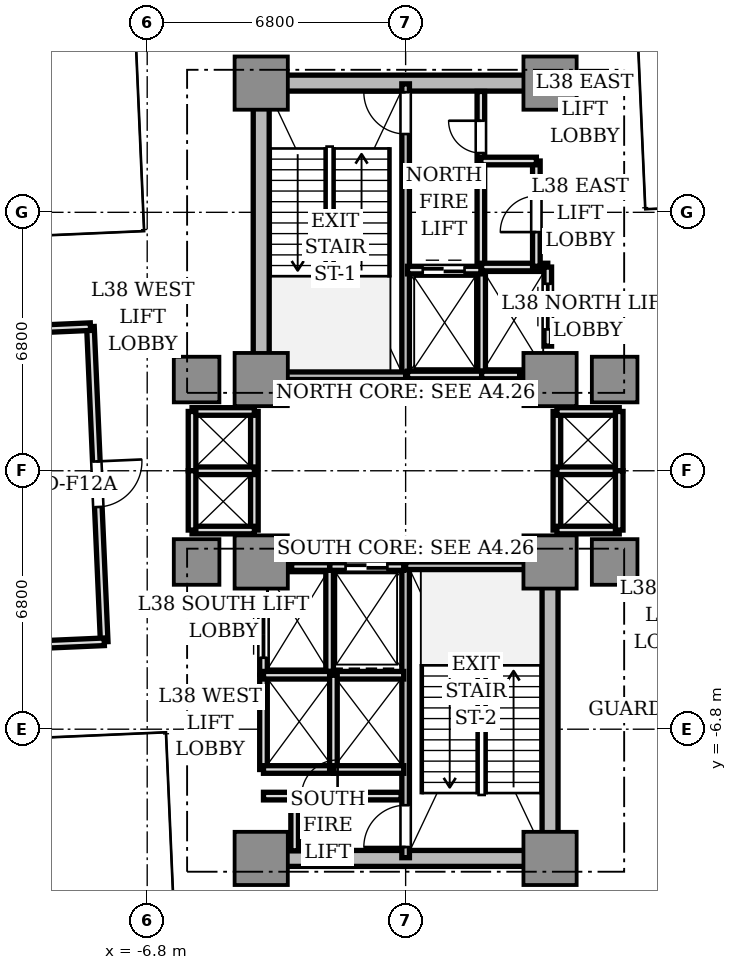
"""IFC4 building model, lengths in metres.
Left out: names, types, materials, properties, quantities, classifications, styles, units other than length and angle.
Written with IfcOpenShell. Run it as: python <this file> out.ifc"""

import sys

from ifc_helpers import new_model, si_unit, direction, frame, frame_2d, origin, origin_2d, place, context, subcontext, project, spatial, rectangle, extrude, source, transform, mapped, element, fill, save


model = new_model("IFC4")
c1 = context("Model", 3, precision=1e-05, world=origin(), true_north=direction((0.0, 1.0)))
c2 = subcontext(c1, "Body", "Model", "MODEL_VIEW")
j1 = project(units=[si_unit("LENGTHUNIT", "METRE"), si_unit("PLANEANGLEUNIT", "RADIAN")], contexts=[c1])
p1 = place(None, origin())
s1 = spatial("IfcSite", under=j1, at=p1, CompositionType="ELEMENT")
p2 = place(p1, origin())
s2 = spatial("IfcBuilding", under=s1, at=p2, CompositionType="ELEMENT")
p3 = place(p2, frame((0.0, 0.0, 138.25)))
s3 = spatial("IfcBuildingStorey", under=s2, at=p3, CompositionType="ELEMENT", Elevation=138.25)
p4 = place(p3, frame((-3.55, 10.2, 0.0), z_axis=(0.0, 0.0, 1.0), x_axis=(1.0, 0.0, 0.0)))
e1 = element("IfcWall", 1, at=p4, inside=s3, PredefinedType="SHEAR", context=c2, shape_type="SweptSolid", body=[
    extrude(rectangle(XDim=7.1, YDim=0.42, at=frame_2d((3.55, 0.0))), origin(), (0.0, 0.0, 1.0), 4.18),
])
p5 = place(p3, frame((-3.8, 2.85, 0.0), z_axis=(0.0, 0.0, 1.0), x_axis=(0.0, 1.0, 0.0)))
e2 = element("IfcWall", 2, at=p5, inside=s3, PredefinedType="SHEAR", context=c2, shape_type="SweptSolid", body=[
    extrude(rectangle(XDim=6.9, YDim=0.42, at=frame_2d((3.45, 0.0))), origin(), (0.0, 0.0, 1.0), 4.18),
])
p6 = place(p3, frame((-3.55, -10.2, 0.0), z_axis=(0.0, 0.0, 1.0), x_axis=(1.0, 0.0, 0.0)))
e3 = element("IfcWall", 3, at=p6, inside=s3, PredefinedType="SHEAR", context=c2, shape_type="SweptSolid", body=[
    extrude(rectangle(XDim=7.1, YDim=0.42, at=frame_2d((3.55, 0.0))), origin(), (0.0, 0.0, 1.0), 4.18),
])
p7 = place(p3, frame((3.8, -9.75, 0.0), z_axis=(0.0, 0.0, 1.0), x_axis=(0.0, 1.0, 0.0)))
e4 = element("IfcWall", 4, at=p7, inside=s3, PredefinedType="SHEAR", context=c2, shape_type="SweptSolid", body=[
    extrude(rectangle(XDim=6.9, YDim=0.42, at=frame_2d((3.45, 0.0))), origin(), (0.0, 0.0, 1.0), 4.18),
])
m1 = source(origin(), c2, "Body", "SweptSolid", [
    extrude(rectangle(XDim=1.4, YDim=1.4, at=origin_2d()), origin(), (0.0, 0.0, 1.0), 4.18),
])
for number, where, z_axis, x_axis in (
    (5, (-3.8, 2.4, 0.0), (0.0, 0.0, 1.0), (1.0, 0.0, 0.0)),
    (6, (3.8, 2.4, 0.0), (0.0, 0.0, 1.0), (1.0, 0.0, 0.0)),
    (7, (-3.8, 10.2, 0.0), (0.0, 0.0, 1.0), (1.0, 0.0, 0.0)),
    (8, (3.8, 10.2, 0.0), (0.0, 0.0, 1.0), (1.0, 0.0, 0.0)),
    (9, (-3.8, -2.4, 0.0), (0.0, 0.0, 1.0), (1.0, 0.0, 0.0)),
    (10, (3.8, -2.4, 0.0), (0.0, 0.0, 1.0), (1.0, 0.0, 0.0)),
    (11, (-3.8, -10.2, 0.0), (0.0, 0.0, 1.0), (1.0, 0.0, 0.0)),
    (12, (3.8, -10.2, 0.0), (0.0, 0.0, 1.0), (1.0, 0.0, 0.0)),
):
    element("IfcColumn", number, at=place(p3, frame(where, z_axis=z_axis, x_axis=x_axis)), inside=s3, PredefinedType="COLUMN", context=c2, shape_type="MappedRepresentation", body=[
        mapped(m1, transform((0.0, 0.0, 0.0), scale=1.0)),
    ])
m2 = source(origin(), c2, "Body", "SweptSolid", [
    extrude(rectangle(XDim=1.2, YDim=1.2, at=origin_2d()), origin(), (0.0, 0.0, 1.0), 4.18),
])
for number, where, z_axis, x_axis in (
    (13, (5.5, 2.4, 0.0), (0.0, 0.0, 1.0), (1.0, 0.0, 0.0)),
    (14, (-5.5, 2.4, 0.0), (0.0, 0.0, 1.0), (1.0, 0.0, 0.0)),
    (15, (5.5, -2.4, 0.0), (0.0, 0.0, 1.0), (1.0, 0.0, 0.0)),
    (16, (-5.5, -2.4, 0.0), (0.0, 0.0, 1.0), (1.0, 0.0, 0.0)),
):
    element("IfcColumn", number, at=place(p3, frame(where, z_axis=z_axis, x_axis=x_axis)), inside=s3, PredefinedType="COLUMN", context=c2, shape_type="MappedRepresentation", body=[
        mapped(m2, transform((0.0, 0.0, 0.0), scale=1.0)),
    ])
p8 = place(p3, frame((0.0, 2.5, 0.0), z_axis=(0.0, 0.0, 1.0), x_axis=(0.0, 1.0, 0.0)))
e17 = element("IfcWall", 17, at=p8, inside=s3, PredefinedType="SOLIDWALL", context=c2, shape_type="SweptSolid", body=[
    extrude(rectangle(XDim=7.68, YDim=0.2, at=frame_2d((3.84, 0.0))), origin(), (0.0, 0.0, 1.0), 4.18),
])
p9 = place(p8, frame((6.36, 0.0, 0.0)))
e18 = element("IfcOpeningElement", 18, at=p9, cuts=e17, PredefinedType="OPENING", context=c2, shape_type="SweptSolid", body=[
    extrude(rectangle(XDim=1.1, YDim=2.15, at=frame_2d((0.55, 1.075))), frame((0.0, 0.11, 0.0), z_axis=(0.0, -1.0, 0.0), x_axis=(1.0, 0.0, 0.0)), (0.0, 0.0, 1.0), 0.22),
])
p10 = place(p3, frame((-3.72, 2.5, 0.0), z_axis=(0.0, 0.0, 1.0), x_axis=(1.0, 0.0, 0.0)))
e19 = element("IfcWall", 19, at=p10, inside=s3, PredefinedType="SOLIDWALL", context=c2, shape_type="SweptSolid", body=[
    extrude(rectangle(XDim=3.72, YDim=0.2, at=frame_2d((1.86, 0.0))), origin(), (0.0, 0.0, 1.0), 4.18),
])
p11 = place(p3, frame((0.0, -10.18, 0.0), z_axis=(0.0, 0.0, 1.0), x_axis=(0.0, 1.0, 0.0)))
e20 = element("IfcWall", 20, at=p11, inside=s3, PredefinedType="SOLIDWALL", context=c2, shape_type="SweptSolid", body=[
    extrude(rectangle(XDim=7.68, YDim=0.2, at=frame_2d((3.84, 0.0))), origin(), (0.0, 0.0, 1.0), 4.18),
])
p12 = place(p11, frame((0.28, 0.0, 0.0)))
e21 = element("IfcOpeningElement", 21, at=p12, cuts=e20, PredefinedType="OPENING", context=c2, shape_type="SweptSolid", body=[
    extrude(rectangle(XDim=1.1, YDim=2.15, at=frame_2d((0.55, 1.075))), frame((0.0, 0.11, 0.0), z_axis=(0.0, -1.0, 0.0), x_axis=(1.0, 0.0, 0.0)), (0.0, 0.0, 1.0), 0.22),
])
p13 = place(p3, frame((0.0, -2.5, 0.0), z_axis=(0.0, 0.0, 1.0), x_axis=(1.0, 0.0, 0.0)))
e22 = element("IfcWall", 22, at=p13, inside=s3, PredefinedType="SOLIDWALL", context=c2, shape_type="SweptSolid", body=[
    extrude(rectangle(XDim=3.72, YDim=0.2, at=frame_2d((1.86, 0.0))), origin(), (0.0, 0.0, 1.0), 4.18),
])
p14 = place(p3, frame((1.98, 5.32, 0.0), z_axis=(0.0, 0.0, 1.0), x_axis=(0.0, 1.0, 0.0)))
e23 = element("IfcWall", 23, at=p14, inside=s3, PredefinedType="SOLIDWALL", context=c2, shape_type="SweptSolid", body=[
    extrude(rectangle(XDim=4.66, YDim=0.2, at=frame_2d((2.33, 0.0))), origin(), (0.0, 0.0, 1.0), 3.73),
])
p15 = place(p14, frame((3.04, 0.0, 0.0)))
e24 = element("IfcOpeningElement", 24, at=p15, cuts=e23, PredefinedType="OPENING", context=c2, shape_type="SweptSolid", body=[
    extrude(rectangle(XDim=0.85, YDim=2.1, at=frame_2d((0.425, 1.05))), frame((0.0, 0.11, 0.0), z_axis=(0.0, -1.0, 0.0), x_axis=(1.0, 0.0, 0.0)), (0.0, 0.0, 1.0), 0.22),
])
p16 = place(p3, frame((2.0, 2.5, 0.0), z_axis=(0.0, 0.0, 1.0), x_axis=(0.0, 1.0, 0.0)))
e25 = element("IfcWall", 25, at=p16, inside=s3, PredefinedType="SOLIDWALL", context=c2, shape_type="SweptSolid", body=[
    extrude(rectangle(XDim=2.78, YDim=0.2, at=frame_2d((1.39, 0.0))), origin(), (0.0, 0.0, 1.0), 3.73),
])
p17 = place(p3, frame((0.05, 2.52, 0.0), z_axis=(0.0, 0.0, 1.0), x_axis=(1.0, 0.0, 0.0)))
e26 = element("IfcWall", 26, at=p17, inside=s3, PredefinedType="SOLIDWALL", context=c2, shape_type="SweptSolid", body=[
    extrude(rectangle(XDim=1.95, YDim=0.2, at=frame_2d((0.975, 0.0))), origin(), (0.0, 0.0, 1.0), 3.73),
])
p18 = place(p3, frame((0.05, 5.28, 0.0), z_axis=(0.0, 0.0, 1.0), x_axis=(1.0, 0.0, 0.0)))
e27 = element("IfcWall", 27, at=p18, inside=s3, PredefinedType="SOLIDWALL", context=c2, shape_type="SweptSolid", body=[
    extrude(rectangle(XDim=1.93, YDim=0.2, at=frame_2d((0.965, 0.0))), origin(), (0.0, 0.0, 1.0), 3.73),
])
p19 = place(p18, frame((0.4, 0.0, 0.0)))
e28 = element("IfcOpeningElement", 28, at=p19, cuts=e27, PredefinedType="OPENING", context=c2, shape_type="SweptSolid", body=[
    extrude(rectangle(XDim=1.1, YDim=2.2, at=frame_2d((0.55, 1.1))), frame((0.0, 0.11, 0.0), z_axis=(0.0, -1.0, 0.0), x_axis=(1.0, 0.0, 0.0)), (0.0, 0.0, 1.0), 0.22),
])
p20 = place(p3, frame((-2.0, -5.28, 0.0), z_axis=(0.0, 0.0, 1.0), x_axis=(0.0, 1.0, 0.0)))
e29 = element("IfcWall", 29, at=p20, inside=s3, PredefinedType="SOLIDWALL", context=c2, shape_type="SweptSolid", body=[
    extrude(rectangle(XDim=2.78, YDim=0.2, at=frame_2d((1.39, 0.0))), origin(), (0.0, 0.0, 1.0), 3.73),
])
p21 = place(p3, frame((-2.0, -2.52, 0.0), z_axis=(0.0, 0.0, 1.0), x_axis=(1.0, 0.0, 0.0)))
e30 = element("IfcWall", 30, at=p21, inside=s3, PredefinedType="SOLIDWALL", context=c2, shape_type="SweptSolid", body=[
    extrude(rectangle(XDim=1.95, YDim=0.2, at=frame_2d((0.975, 0.0))), origin(), (0.0, 0.0, 1.0), 3.73),
])
p22 = place(p21, frame((0.42, 0.0, 0.0)))
e31 = element("IfcOpeningElement", 31, at=p22, cuts=e30, PredefinedType="OPENING", context=c2, shape_type="SweptSolid", body=[
    extrude(rectangle(XDim=1.1, YDim=2.2, at=frame_2d((0.55, 1.1))), frame((0.0, 0.11, 0.0), z_axis=(0.0, -1.0, 0.0), x_axis=(1.0, 0.0, 0.0)), (0.0, 0.0, 1.0), 0.22),
])
p23 = place(p3, frame((2.0, 2.52, 0.0), z_axis=(0.0, 0.0, 1.0), x_axis=(1.0, 0.0, 0.0)))
e32 = element("IfcWall", 32, at=p23, inside=s3, PredefinedType="SOLIDWALL", context=c2, shape_type="SweptSolid", body=[
    extrude(rectangle(XDim=1.0, YDim=0.2, at=frame_2d((0.5, 0.0))), origin(), (0.0, 0.0, 1.0), 3.73),
])
p24 = place(p3, frame((2.0, 5.36, 0.0), z_axis=(0.0, 0.0, 1.0), x_axis=(1.0, 0.0, 0.0)))
e33 = element("IfcWall", 33, at=p24, inside=s3, PredefinedType="SOLIDWALL", context=c2, shape_type="SweptSolid", body=[
    extrude(rectangle(XDim=1.74, YDim=0.2, at=frame_2d((0.87, 0.0))), origin(), (0.0, 0.0, 1.0), 3.73),
])
p25 = place(p3, frame((3.74, 3.28, 0.0), z_axis=(0.0, 0.0, 1.0), x_axis=(0.0, 1.0, 0.0)))
e34 = element("IfcWall", 34, at=p25, inside=s3, PredefinedType="SOLIDWALL", context=c2, shape_type="SweptSolid", body=[
    extrude(rectangle(XDim=2.08, YDim=0.2, at=frame_2d((1.04, 0.0))), origin(), (0.0, 0.0, 1.0), 3.73),
])
p26 = place(p25, frame((0.44, 0.0, 0.0)))
e35 = element("IfcOpeningElement", 35, at=p26, cuts=e34, PredefinedType="OPENING", context=c2, shape_type="SweptSolid", body=[
    extrude(rectangle(XDim=1.2, YDim=2.2, at=frame_2d((0.6, 1.1))), frame((0.0, 0.11, 0.0), z_axis=(0.0, -1.0, 0.0), x_axis=(1.0, 0.0, 0.0)), (0.0, 0.0, 1.0), 0.22),
])
p27 = place(p3, frame((-3.0, -2.52, 0.0), z_axis=(0.0, 0.0, 1.0), x_axis=(1.0, 0.0, 0.0)))
e36 = element("IfcWall", 36, at=p27, inside=s3, PredefinedType="SOLIDWALL", context=c2, shape_type="SweptSolid", body=[
    extrude(rectangle(XDim=1.0, YDim=0.2, at=frame_2d((0.5, 0.0))), origin(), (0.0, 0.0, 1.0), 3.73),
])
p28 = place(p3, frame((-3.74, -5.36, 0.0), z_axis=(0.0, 0.0, 1.0), x_axis=(0.0, 1.0, 0.0)))
e37 = element("IfcWall", 37, at=p28, inside=s3, PredefinedType="SOLIDWALL", context=c2, shape_type="SweptSolid", body=[
    extrude(rectangle(XDim=2.08, YDim=0.2, at=frame_2d((1.04, 0.0))), origin(), (0.0, 0.0, 1.0), 3.73),
])
p29 = place(p28, frame((0.44, 0.0, 0.0)))
e38 = element("IfcOpeningElement", 38, at=p29, cuts=e37, PredefinedType="OPENING", context=c2, shape_type="SweptSolid", body=[
    extrude(rectangle(XDim=1.2, YDim=2.2, at=frame_2d((0.6, 1.1))), frame((0.0, 0.11, 0.0), z_axis=(0.0, -1.0, 0.0), x_axis=(1.0, 0.0, 0.0)), (0.0, 0.0, 1.0), 0.22),
])
p30 = place(p3, frame((-3.74, -7.86, 0.0), z_axis=(0.0, 0.0, 1.0), x_axis=(0.0, 1.0, 0.0)))
e39 = element("IfcWall", 39, at=p30, inside=s3, PredefinedType="SOLIDWALL", context=c2, shape_type="SweptSolid", body=[
    extrude(rectangle(XDim=2.48, YDim=0.2, at=frame_2d((1.24, 0.0))), origin(), (0.0, 0.0, 1.0), 3.73),
])
p31 = place(p3, frame((-3.74, -7.86, 0.0), z_axis=(0.0, 0.0, 1.0), x_axis=(1.0, 0.0, 0.0)))
e40 = element("IfcWall", 40, at=p31, inside=s3, PredefinedType="SOLIDWALL", context=c2, shape_type="SweptSolid", body=[
    extrude(rectangle(XDim=1.84, YDim=0.2, at=frame_2d((0.92, 0.0))), origin(), (0.0, 0.0, 1.0), 3.73),
])
p32 = place(p3, frame((-3.74, -5.38, 0.0), z_axis=(0.0, 0.0, 1.0), x_axis=(1.0, 0.0, 0.0)))
e41 = element("IfcWall", 41, at=p32, inside=s3, PredefinedType="SOLIDWALL", context=c2, shape_type="SweptSolid", body=[
    extrude(rectangle(XDim=3.69, YDim=0.2, at=frame_2d((1.845, 0.0))), origin(), (0.0, 0.0, 1.0), 3.73),
])
p33 = place(p3, frame((-1.9, -7.86, 0.0), z_axis=(0.0, 0.0, 1.0), x_axis=(0.0, 1.0, 0.0)))
e42 = element("IfcWall", 42, at=p33, inside=s3, PredefinedType="SOLIDWALL", context=c2, shape_type="SweptSolid", body=[
    extrude(rectangle(XDim=2.48, YDim=0.2, at=frame_2d((1.24, 0.0))), origin(), (0.0, 0.0, 1.0), 3.73),
])
p34 = place(p3, frame((-1.9, -7.86, 0.0), z_axis=(0.0, 0.0, 1.0), x_axis=(1.0, 0.0, 0.0)))
e43 = element("IfcWall", 43, at=p34, inside=s3, PredefinedType="SOLIDWALL", context=c2, shape_type="SweptSolid", body=[
    extrude(rectangle(XDim=1.85, YDim=0.2, at=frame_2d((0.925, 0.0))), origin(), (0.0, 0.0, 1.0), 3.73),
])
p35 = place(p3, frame((3.98, -1.56, 0.0), z_axis=(0.0, 0.0, 1.0), x_axis=(0.0, 1.0, 0.0)))
e44 = element("IfcWall", 44, at=p35, inside=s3, PredefinedType="SOLIDWALL", context=c2, shape_type="SweptSolid", body=[
    extrude(rectangle(XDim=3.12, YDim=0.2, at=frame_2d((1.56, 0.0))), origin(), (0.0, 0.0, 1.0), 3.35),
])
for number, where, z_axis, x_axis in (
    (45, (3.98, 1.56, 0.0), (0.0, 0.0, 1.0), (1.0, 0.0, 0.0)),
    (46, (3.98, -1.56, 0.0), (0.0, 0.0, 1.0), (1.0, 0.0, 0.0)),
    (47, (3.98, 0.0, 0.0), (0.0, 0.0, 1.0), (1.0, 0.0, 0.0)),
):
    element("IfcWall", number, at=place(p3, frame(where, z_axis=z_axis, x_axis=x_axis)), inside=s3, PredefinedType="SOLIDWALL", context=c2, shape_type="SweptSolid", body=[
        extrude(rectangle(XDim=1.64, YDim=0.2, at=frame_2d((0.82, 0.0))), origin(), (0.0, 0.0, 1.0), 3.73),
    ])
for number, where, z_axis, x_axis in (
    (48, (5.62, 0.0, 0.0), (0.0, 0.0, 1.0), (0.0, 1.0, 0.0)),
    (49, (5.62, -1.56, 0.0), (0.0, 0.0, 1.0), (0.0, 1.0, 0.0)),
):
    element("IfcWall", number, at=place(p3, frame(where, z_axis=z_axis, x_axis=x_axis)), inside=s3, PredefinedType="SOLIDWALL", context=c2, shape_type="SweptSolid", body=[
        extrude(rectangle(XDim=1.56, YDim=0.2, at=frame_2d((0.78, 0.0))), origin(), (0.0, 0.0, 1.0), 3.73),
    ])
p36 = place(p3, frame((-3.98, -1.56, 0.0), z_axis=(0.0, 0.0, 1.0), x_axis=(0.0, 1.0, 0.0)))
e50 = element("IfcWall", 50, at=p36, inside=s3, PredefinedType="SOLIDWALL", context=c2, shape_type="SweptSolid", body=[
    extrude(rectangle(XDim=3.12, YDim=0.2, at=frame_2d((1.56, 0.0))), origin(), (0.0, 0.0, 1.0), 3.35),
])
for number, where, z_axis, x_axis in (
    (51, (-5.62, 1.56, 0.0), (0.0, 0.0, 1.0), (1.0, 0.0, 0.0)),
    (52, (-5.62, -1.56, 0.0), (0.0, 0.0, 1.0), (1.0, 0.0, 0.0)),
    (53, (-5.62, 0.0, 0.0), (0.0, 0.0, 1.0), (1.0, 0.0, 0.0)),
):
    element("IfcWall", number, at=place(p3, frame(where, z_axis=z_axis, x_axis=x_axis)), inside=s3, PredefinedType="SOLIDWALL", context=c2, shape_type="SweptSolid", body=[
        extrude(rectangle(XDim=1.64, YDim=0.2, at=frame_2d((0.82, 0.0))), origin(), (0.0, 0.0, 1.0), 3.73),
    ])
for number, where, z_axis, x_axis in (
    (54, (-5.62, 0.0, 0.0), (0.0, 0.0, 1.0), (0.0, 1.0, 0.0)),
    (55, (-5.62, -1.56, 0.0), (0.0, 0.0, 1.0), (0.0, 1.0, 0.0)),
):
    element("IfcWall", number, at=place(p3, frame(where, z_axis=z_axis, x_axis=x_axis)), inside=s3, PredefinedType="SOLIDWALL", context=c2, shape_type="SweptSolid", body=[
        extrude(rectangle(XDim=1.56, YDim=0.2, at=frame_2d((0.78, 0.0))), origin(), (0.0, 0.0, 1.0), 3.73),
    ])
p37 = place(p3, frame((-3.74, -8.56, 0.0), z_axis=(0.0, 0.0, 1.0), x_axis=(1.0, 0.0, 0.0)))
e56 = element("IfcWall", 56, at=p37, inside=s3, PredefinedType="SOLIDWALL", context=c2, shape_type="SweptSolid", body=[
    extrude(rectangle(XDim=3.62, YDim=0.2, at=frame_2d((1.81, 0.0))), origin(), (0.0, 0.0, 1.0), 3.73),
])
p38 = place(p37, frame((1.0, 0.0, 0.0)))
e57 = element("IfcOpeningElement", 57, at=p38, cuts=e56, PredefinedType="OPENING", context=c2, shape_type="SweptSolid", body=[
    extrude(rectangle(XDim=0.95, YDim=2.15, at=frame_2d((0.475, 1.075))), frame((0.0, 0.11, 0.0), z_axis=(0.0, -1.0, 0.0), x_axis=(1.0, 0.0, 0.0)), (0.0, 0.0, 1.0), 0.22),
])
p39 = place(p3, frame((-2.92, -10.0, 0.0), z_axis=(0.0, 0.0, 1.0), x_axis=(0.0, 1.0, 0.0)))
e58 = element("IfcWall", 58, at=p39, inside=s3, PredefinedType="SOLIDWALL", context=c2, shape_type="SweptSolid", body=[
    extrude(rectangle(XDim=1.44, YDim=0.2, at=frame_2d((0.72, 0.0))), origin(), (0.0, 0.0, 1.0), 3.73),
])
p40 = place(p3, frame((3.44, 5.38, 0.0), z_axis=(0.0, 0.0, 1.0), x_axis=(0.0, 1.0, 0.0)))
e59 = element("IfcWall", 59, at=p40, inside=s3, PredefinedType="SOLIDWALL", context=c2, shape_type="SweptSolid", body=[
    extrude(rectangle(XDim=2.77, YDim=0.2, at=frame_2d((1.385, 0.0))), origin(), (0.0, 0.0, 1.0), 3.73),
])
p41 = place(p40, frame((0.9, 0.0, 0.0)))
e60 = element("IfcOpeningElement", 60, at=p41, cuts=e59, PredefinedType="OPENING", context=c2, shape_type="SweptSolid", body=[
    extrude(rectangle(XDim=0.95, YDim=2.15, at=frame_2d((0.475, 1.075))), frame((0.0, 0.11, 0.0), z_axis=(0.0, -1.0, 0.0), x_axis=(1.0, 0.0, 0.0)), (0.0, 0.0, 1.0), 0.22),
])
p42 = place(p3, frame((1.98, 8.15, 0.0), z_axis=(0.0, 0.0, 1.0), x_axis=(1.0, 0.0, 0.0)))
e61 = element("IfcWall", 61, at=p42, inside=s3, PredefinedType="SOLIDWALL", context=c2, shape_type="SweptSolid", body=[
    extrude(rectangle(XDim=1.46, YDim=0.2, at=frame_2d((0.73, 0.0))), origin(), (0.0, 0.0, 1.0), 3.73),
])
p43 = place(p3, frame((-8.293, 3.792, 0.0), z_axis=(0.0, 0.0, 1.0), x_axis=(0.043591675458, -0.999049431125, 0.0)))
e62 = element("IfcWall", 62, at=p43, inside=s3, PredefinedType="SOLIDWALL", context=c2, shape_type="SweptSolid", body=[
    extrude(rectangle(XDim=8.3, YDim=0.2, at=frame_2d((4.15, 0.0))), origin(), (0.0, 0.0, 1.0), 3.73),
])
p44 = place(p43, frame((3.55, 0.0, 0.0)))
e63 = element("IfcOpeningElement", 63, at=p44, cuts=e62, PredefinedType="OPENING", context=c2, shape_type="SweptSolid", body=[
    extrude(rectangle(XDim=1.2, YDim=2.2, at=frame_2d((0.6, 1.1))), frame((0.0, 0.11, 0.0), z_axis=(0.0, -1.0, 0.0), x_axis=(1.0, 0.0, 0.0)), (0.0, 0.0, 1.0), 0.22),
])
p45 = place(p3, frame((-7.931, -4.5, 0.0), z_axis=(0.0, 0.0, 1.0), x_axis=(-0.999047967879, -0.04362519773, 0.0)))
e64 = element("IfcWall", 64, at=p45, inside=s3, PredefinedType="SOLIDWALL", context=c2, shape_type="SweptSolid", body=[
    extrude(rectangle(XDim=8.68, YDim=0.2, at=frame_2d((4.34, 0.0))), origin(), (0.0, 0.0, 1.0), 2.65),
])
p46 = place(p3, frame((-8.293, 3.792, 0.0), z_axis=(0.0, 0.0, 1.0), x_axis=(-0.999046795199, -0.043652044655, 0.0)))
e65 = element("IfcWall", 65, at=p46, inside=s3, PredefinedType="SOLIDWALL", context=c2, shape_type="SweptSolid", body=[
    extrude(rectangle(XDim=8.68, YDim=0.2, at=frame_2d((4.34, 0.0))), origin(), (0.0, 0.0, 1.0), 2.65),
])
m3 = source(origin(), c2, "Body", "SweptSolid", [
    extrude(rectangle(XDim=1.1, YDim=0.05, at=origin_2d()), origin(), (0.0, 0.0, 1.0), 2.15),
])
p47 = place(p9, frame((0.55, 0.0, 0.0)))
e66 = element("IfcDoor", 66, at=p47, inside=s3, OperationType="SINGLE_SWING_RIGHT", PredefinedType="DOOR", context=c2, shape_type="MappedRepresentation", body=[
    mapped(m3, transform((0.0, 0.0, 0.0), scale=1.0)),
])
fill(e18, e66)
m4 = source(origin(), c2, "Body", "SweptSolid", [
    extrude(rectangle(XDim=0.85, YDim=0.05, at=origin_2d()), origin(), (0.0, 0.0, 1.0), 2.1),
])
p48 = place(p15, frame((0.425, 0.0, 0.0)))
e67 = element("IfcDoor", 67, at=p48, inside=s3, OperationType="SINGLE_SWING_RIGHT", PredefinedType="DOOR", context=c2, shape_type="MappedRepresentation", body=[
    mapped(m4, transform((0.0, 0.0, 0.0), scale=1.0)),
])
fill(e24, e67)
m5 = source(origin(), c2, "Body", "SweptSolid", [
    extrude(rectangle(XDim=1.1, YDim=0.05, at=origin_2d()), origin(), (0.0, 0.0, 1.0), 2.2),
])
p49 = place(p19, frame((0.55, 0.0, 0.0)))
e68 = element("IfcDoor", 68, at=p49, inside=s3, OperationType="DOUBLE_DOOR_SLIDING", PredefinedType="DOOR", context=c2, shape_type="MappedRepresentation", body=[
    mapped(m5, transform((0.0, 0.0, 0.0), scale=1.0)),
])
fill(e28, e68)
p50 = place(p22, frame((0.55, 0.0, 0.0)))
e69 = element("IfcDoor", 69, at=p50, inside=s3, OperationType="DOUBLE_DOOR_SLIDING", PredefinedType="DOOR", context=c2, shape_type="MappedRepresentation", body=[
    mapped(m5, transform((0.0, 0.0, 0.0), scale=1.0)),
])
fill(e31, e69)
m6 = source(origin(), c2, "Body", "SweptSolid", [
    extrude(rectangle(XDim=1.2, YDim=0.05, at=origin_2d()), origin(), (0.0, 0.0, 1.0), 2.2),
])
p51 = place(p26, frame((0.6, 0.0, 0.0)))
e70 = element("IfcDoor", 70, at=p51, inside=s3, OperationType="DOUBLE_DOOR_SLIDING", PredefinedType="DOOR", context=c2, shape_type="MappedRepresentation", body=[
    mapped(m6, transform((0.0, 0.0, 0.0), scale=1.0)),
])
fill(e35, e70)
p52 = place(p29, frame((0.6, 0.0, 0.0)))
e71 = element("IfcDoor", 71, at=p52, inside=s3, OperationType="DOUBLE_DOOR_SLIDING", PredefinedType="DOOR", context=c2, shape_type="MappedRepresentation", body=[
    mapped(m6, transform((0.0, 0.0, 0.0), scale=1.0)),
])
fill(e38, e71)
p53 = place(p12, frame((0.55, 0.0, 0.0)))
e72 = element("IfcDoor", 72, at=p53, inside=s3, OperationType="SINGLE_SWING_LEFT", PredefinedType="DOOR", context=c2, shape_type="MappedRepresentation", body=[
    mapped(m3, transform((0.0, 0.0, 0.0), scale=1.0)),
])
fill(e21, e72)
m7 = source(origin(), c2, "Body", "SweptSolid", [
    extrude(rectangle(XDim=0.95, YDim=0.05, at=origin_2d()), origin(), (0.0, 0.0, 1.0), 2.15),
])
p54 = place(p38, frame((0.475, 0.0, 0.0)))
e73 = element("IfcDoor", 73, at=p54, inside=s3, OperationType="SINGLE_SWING_RIGHT", PredefinedType="DOOR", context=c2, shape_type="MappedRepresentation", body=[
    mapped(m7, transform((0.0, 0.0, 0.0), scale=1.0)),
])
fill(e57, e73)
p55 = place(p41, frame((0.475, 0.0, 0.0)))
e74 = element("IfcDoor", 74, at=p55, inside=s3, OperationType="SINGLE_SWING_LEFT", PredefinedType="DOOR", context=c2, shape_type="MappedRepresentation", body=[
    mapped(m7, transform((0.0, 0.0, 0.0), scale=1.0)),
])
fill(e60, e74)
p56 = place(p44, frame((0.6, 0.0, 0.0)))
e75 = element("IfcDoor", 75, at=p56, inside=s3, OperationType="SINGLE_SWING_LEFT", PredefinedType="DOOR", context=c2, shape_type="MappedRepresentation", body=[
    mapped(m6, transform((0.0, 0.0, 0.0), scale=1.0)),
])
fill(e63, e75)
save(model, sys.argv[1])
